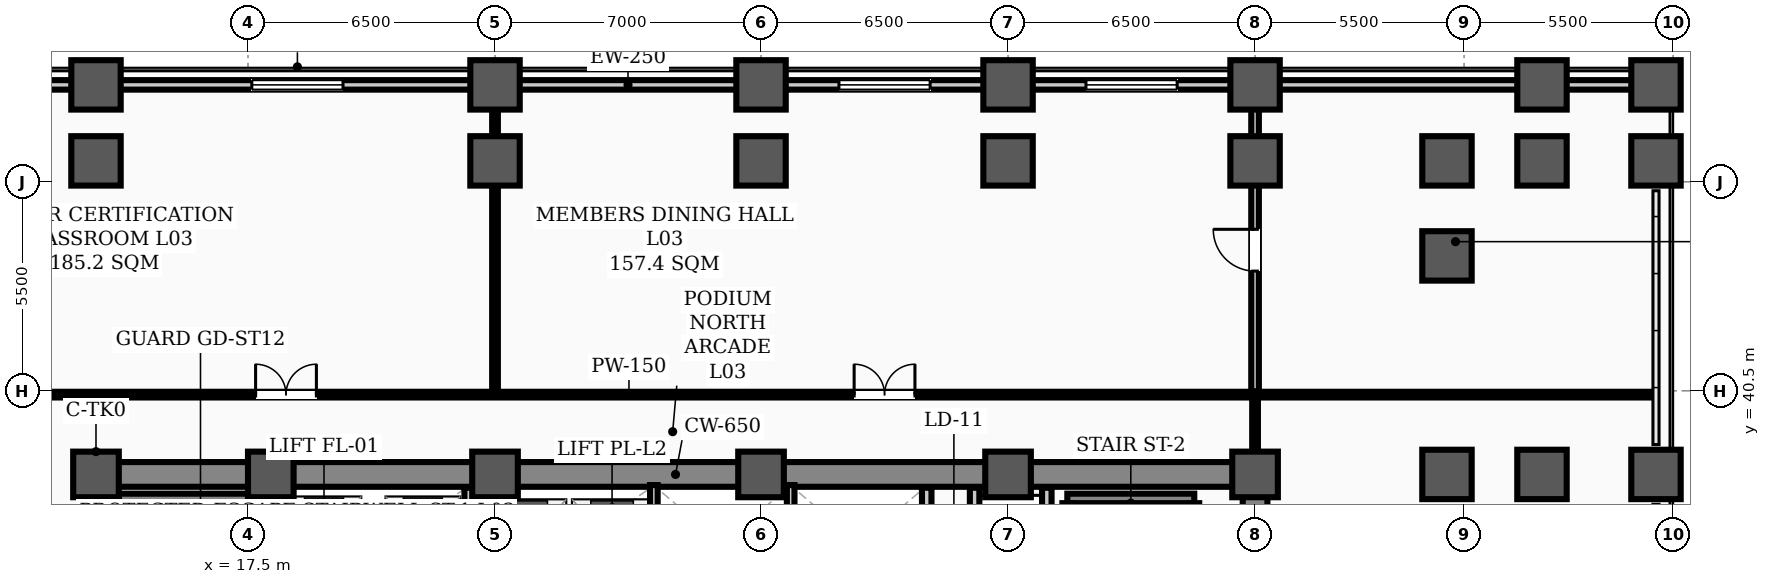
"""IFC4 building model, lengths in metres.
Left out: names, types, materials, properties, quantities, classifications, styles, units other than length and angle.
Written with IfcOpenShell. Run it as: python <this file> out.ifc"""

import sys

from ifc_helpers import new_model, si_unit, direction, frame, frame_2d, origin, origin_2d, place, context, subcontext, project, spatial, rectangle, hollow_rectangle, extrude, element, fill, save


model = new_model("IFC4")
c1 = context("Model", 3, precision=1e-05, world=origin(), true_north=direction((0.0, 1.0)))
c2 = subcontext(c1, "Body", "Model", "MODEL_VIEW")
j1 = project(units=[si_unit("LENGTHUNIT", "METRE"), si_unit("PLANEANGLEUNIT", "RADIAN")], contexts=[c1])
p1 = place(None, origin())
s1 = spatial("IfcSite", under=j1, at=p1, CompositionType="ELEMENT")
p2 = place(p1, origin())
s2 = spatial("IfcBuilding", under=s1, at=p2, CompositionType="ELEMENT")
p3 = place(p2, frame((0.0, 0.0, 11.2)))
s3 = spatial("IfcBuildingStorey", under=s2, at=p3, CompositionType="ELEMENT", Elevation=11.2)
for number, where, z_axis, x_axis in (
    (1, (13.5, 38.3, 0.0), (0.0, 0.0, 1.0), (1.0, 0.0, 0.0)),
    (2, (18.1, 38.3, 0.0), (0.0, 0.0, 1.0), (1.0, 0.0, 0.0)),
    (3, (24.0, 38.3, 0.0), (0.0, 0.0, 1.0), (1.0, 0.0, 0.0)),
    (4, (31.0, 38.3, 0.0), (0.0, 0.0, 1.0), (1.0, 0.0, 0.0)),
    (5, (37.5, 38.3, 0.0), (0.0, 0.0, 1.0), (1.0, 0.0, 0.0)),
    (6, (44.0, 38.3, 0.0), (0.0, 0.0, 1.0), (1.0, 0.0, 0.0)),
):
    element("IfcColumn", number, at=place(p3, frame(where, z_axis=z_axis, x_axis=x_axis)), inside=s3, PredefinedType="COLUMN", context=c2, shape_type="SweptSolid", body=[
        extrude(hollow_rectangle(XDim=1.2, YDim=1.2, WallThickness=0.04, InnerFilletRadius=0.02, OuterFilletRadius=0.06, at=origin_2d()), origin(), (0.0, 0.0, 1.0), 5.4),
    ])
for number, where, z_axis, x_axis in (
    (7, (13.5, 46.55, 0.0), (0.0, 0.0, 1.0), (1.0, 0.0, 0.0)),
    (8, (13.5, 48.55, 0.0), (0.0, 0.0, 1.0), (1.0, 0.0, 0.0)),
    (9, (24.0, 46.55, 0.0), (0.0, 0.0, 1.0), (1.0, 0.0, 0.0)),
    (10, (24.0, 48.55, 0.0), (0.0, 0.0, 1.0), (1.0, 0.0, 0.0)),
    (11, (31.0, 46.55, 0.0), (0.0, 0.0, 1.0), (1.0, 0.0, 0.0)),
    (12, (31.0, 48.55, 0.0), (0.0, 0.0, 1.0), (1.0, 0.0, 0.0)),
    (13, (37.5, 46.55, 0.0), (0.0, 0.0, 1.0), (1.0, 0.0, 0.0)),
    (14, (37.5, 48.55, 0.0), (0.0, 0.0, 1.0), (1.0, 0.0, 0.0)),
    (15, (44.0, 46.55, 0.0), (0.0, 0.0, 1.0), (1.0, 0.0, 0.0)),
    (16, (44.0, 48.55, 0.0), (0.0, 0.0, 1.0), (1.0, 0.0, 0.0)),
    (17, (49.05, 38.3, 0.0), (0.0, 0.0, 1.0), (1.0, 0.0, 0.0)),
    (18, (49.05, 44.05, 0.0), (0.0, 0.0, 1.0), (1.0, 0.0, 0.0)),
    (19, (49.05, 46.55, 0.0), (0.0, 0.0, 1.0), (1.0, 0.0, 0.0)),
    (20, (51.55, 38.3, 0.0), (0.0, 0.0, 1.0), (1.0, 0.0, 0.0)),
    (21, (51.55, 46.55, 0.0), (0.0, 0.0, 1.0), (1.0, 0.0, 0.0)),
    (22, (51.55, 48.55, 0.0), (0.0, 0.0, 1.0), (1.0, 0.0, 0.0)),
    (23, (54.55, 38.3, 0.0), (0.0, 0.0, 1.0), (1.0, 0.0, 0.0)),
    (24, (54.55, 46.55, 0.0), (0.0, 0.0, 1.0), (1.0, 0.0, 0.0)),
    (25, (54.55, 48.55, 0.0), (0.0, 0.0, 1.0), (1.0, 0.0, 0.0)),
):
    element("IfcColumn", number, at=place(p3, frame(where, z_axis=z_axis, x_axis=x_axis)), inside=s3, PredefinedType="COLUMN", context=c2, shape_type="SweptSolid", body=[
        extrude(rectangle(XDim=1.3, YDim=1.3, at=origin_2d()), origin(), (0.0, 0.0, 1.0), 5.4),
    ])
p4 = place(p3, frame((0.45, 48.55, 0.0), z_axis=(0.0, 0.0, 1.0), x_axis=(1.0, 0.0, 0.0)))
e26 = element("IfcWall", 26, at=p4, inside=s3, PredefinedType="STANDARD", context=c2, shape_type="SweptSolid", body=[
    extrude(rectangle(XDim=54.1, YDim=0.25, at=frame_2d((27.05, 0.0))), origin(), (0.0, 0.0, 1.0), 4.37),
])
p5 = place(p4, frame((7.55, 0.0, 0.9)))
e27 = element("IfcOpeningElement", 27, at=p5, cuts=e26, PredefinedType="OPENING", context=c2, shape_type="SweptSolid", body=[
    extrude(rectangle(XDim=2.4, YDim=2.1, at=frame_2d((1.2, 1.05))), frame((0.0, 0.135, 0.0), z_axis=(0.0, -1.0, 0.0), x_axis=(1.0, 0.0, 0.0)), (0.0, 0.0, 1.0), 0.27),
])
p6 = place(p4, frame((17.15, 0.0, 0.9)))
e28 = element("IfcOpeningElement", 28, at=p6, cuts=e26, PredefinedType="OPENING", context=c2, shape_type="SweptSolid", body=[
    extrude(rectangle(XDim=2.4, YDim=2.1, at=frame_2d((1.2, 1.05))), frame((0.0, 0.135, 0.0), z_axis=(0.0, -1.0, 0.0), x_axis=(1.0, 0.0, 0.0)), (0.0, 0.0, 1.0), 0.27),
])
p7 = place(p4, frame((32.6, 0.0, 0.9)))
e29 = element("IfcOpeningElement", 29, at=p7, cuts=e26, PredefinedType="OPENING", context=c2, shape_type="SweptSolid", body=[
    extrude(rectangle(XDim=2.4, YDim=2.1, at=frame_2d((1.2, 1.05))), frame((0.0, 0.135, 0.0), z_axis=(0.0, -1.0, 0.0), x_axis=(1.0, 0.0, 0.0)), (0.0, 0.0, 1.0), 0.27),
])
p8 = place(p4, frame((39.1, 0.0, 0.9)))
e30 = element("IfcOpeningElement", 30, at=p8, cuts=e26, PredefinedType="OPENING", context=c2, shape_type="SweptSolid", body=[
    extrude(rectangle(XDim=2.4, YDim=2.1, at=frame_2d((1.2, 1.05))), frame((0.0, 0.135, 0.0), z_axis=(0.0, -1.0, 0.0), x_axis=(1.0, 0.0, 0.0)), (0.0, 0.0, 1.0), 0.27),
])
p9 = place(p3, frame((13.5, 38.3, 0.0), z_axis=(0.0, 0.0, 1.0), x_axis=(1.0, 0.0, 0.0)))
e31 = element("IfcWall", 31, at=p9, inside=s3, PredefinedType="SHEAR", context=c2, shape_type="SweptSolid", body=[
    extrude(rectangle(XDim=30.5, YDim=0.65, at=frame_2d((15.25, 0.0))), origin(), (0.0, 0.0, 1.0), 5.15),
])
for number, where, z_axis, x_axis in (
    (32, (13.5, 29.35, 0.0), (0.0, 0.0, 1.0), (0.0, 1.0, 0.0)),
    (33, (44.0, 29.35, 0.0), (0.0, 0.0, 1.0), (0.0, 1.0, 0.0)),
):
    element("IfcWall", number, at=place(p3, frame(where, z_axis=z_axis, x_axis=x_axis)), inside=s3, PredefinedType="SHEAR", context=c2, shape_type="SweptSolid", body=[
        extrude(rectangle(XDim=8.6, YDim=0.65, at=frame_2d((4.3, 0.0))), origin(), (0.0, 0.0, 1.0), 5.15),
    ])
p10 = place(p3, frame((14.1, 37.669, 0.0), z_axis=(0.0, 0.0, 1.0), x_axis=(1.0, 0.0, 0.0)))
e34 = element("IfcWall", 34, at=p10, inside=s3, PredefinedType="STANDARD", context=c2, shape_type="SweptSolid", body=[
    extrude(rectangle(XDim=3.67, YDim=0.25, at=frame_2d((1.835, 0.0))), origin(), (0.0, 0.0, 1.0), 5.15),
])
for number, where, z_axis, x_axis in (
    (35, (14.425, 30.36, 0.0), (0.0, 0.0, 1.0), (0.0, 1.0, 0.0)),
    (36, (17.775, 30.36, 0.0), (0.0, 0.0, 1.0), (0.0, 1.0, 0.0)),
):
    element("IfcWall", number, at=place(p3, frame(where, z_axis=z_axis, x_axis=x_axis)), inside=s3, PredefinedType="STANDARD", context=c2, shape_type="SweptSolid", body=[
        extrude(rectangle(XDim=7.184, YDim=0.25, at=frame_2d((3.592, 0.0))), origin(), (0.0, 0.0, 1.0), 5.15),
    ])
p11 = place(p3, frame((39.06, 37.669, 0.0), z_axis=(0.0, 0.0, 1.0), x_axis=(1.0, 0.0, 0.0)))
e37 = element("IfcWall", 37, at=p11, inside=s3, PredefinedType="STANDARD", context=c2, shape_type="SweptSolid", body=[
    extrude(rectangle(XDim=3.34, YDim=0.25, at=frame_2d((1.67, 0.0))), origin(), (0.0, 0.0, 1.0), 5.15),
])
for number, where, z_axis, x_axis in (
    (38, (39.055, 30.36, 0.0), (0.0, 0.0, 1.0), (0.0, 1.0, 0.0)),
    (39, (42.405, 30.36, 0.0), (0.0, 0.0, 1.0), (0.0, 1.0, 0.0)),
):
    element("IfcWall", number, at=place(p3, frame(where, z_axis=z_axis, x_axis=x_axis)), inside=s3, PredefinedType="STANDARD", context=c2, shape_type="SweptSolid", body=[
        extrude(rectangle(XDim=7.184, YDim=0.25, at=frame_2d((3.592, 0.0))), origin(), (0.0, 0.0, 1.0), 5.15),
    ])
p12 = place(p3, frame((36.62, 31.95, 0.0), z_axis=(0.0, 0.0, 1.0), x_axis=(0.0, 1.0, 0.0)))
e40 = element("IfcWall", 40, at=p12, inside=s3, PredefinedType="STANDARD", context=c2, shape_type="SweptSolid", body=[
    extrude(rectangle(XDim=6.0, YDim=0.25, at=frame_2d((3.0, 0.0))), origin(), (0.0, 0.0, 1.0), 4.33),
])
p13 = place(p12, frame((0.9, 0.0, 0.0)))
e41 = element("IfcOpeningElement", 41, at=p13, cuts=e40, PredefinedType="OPENING", context=c2, shape_type="SweptSolid", body=[
    extrude(rectangle(XDim=1.1, YDim=2.08, at=frame_2d((0.55, 1.04))), frame((0.0, 0.135, 0.0), z_axis=(0.0, -1.0, 0.0), x_axis=(1.0, 0.0, 0.0)), (0.0, 0.0, 1.0), 0.27),
])
p14 = place(p12, frame((4.0, 0.0, 0.0)))
e42 = element("IfcOpeningElement", 42, at=p14, cuts=e40, PredefinedType="OPENING", context=c2, shape_type="SweptSolid", body=[
    extrude(rectangle(XDim=1.1, YDim=2.08, at=frame_2d((0.55, 1.04))), frame((0.0, 0.135, 0.0), z_axis=(0.0, -1.0, 0.0), x_axis=(1.0, 0.0, 0.0)), (0.0, 0.0, 1.0), 0.27),
])
p15 = place(p3, frame((38.52, 31.95, 0.0), z_axis=(0.0, 0.0, 1.0), x_axis=(0.0, 1.0, 0.0)))
e43 = element("IfcWall", 43, at=p15, inside=s3, PredefinedType="STANDARD", context=c2, shape_type="SweptSolid", body=[
    extrude(rectangle(XDim=6.0, YDim=0.25, at=frame_2d((3.0, 0.0))), origin(), (0.0, 0.0, 1.0), 4.33),
])
for number, where, z_axis, x_axis in (
    (44, (18.28, 34.62, 0.0), (0.0, 0.0, 1.0), (0.0, 1.0, 0.0)),
    (45, (23.32, 34.62, 0.0), (0.0, 0.0, 1.0), (0.0, 1.0, 0.0)),
):
    element("IfcWall", number, at=place(p3, frame(where, z_axis=z_axis, x_axis=x_axis)), inside=s3, PredefinedType="STANDARD", context=c2, shape_type="SweptSolid", body=[
        extrude(rectangle(XDim=3.33, YDim=0.25, at=frame_2d((1.665, 0.0))), origin(), (0.0, 0.0, 1.0), 4.33),
    ])
p16 = place(p3, frame((35.36, 34.9, 0.0), z_axis=(0.0, 0.0, 1.0), x_axis=(0.0, 1.0, 0.0)))
e46 = element("IfcWall", 46, at=p16, inside=s3, PredefinedType="STANDARD", context=c2, shape_type="SweptSolid", body=[
    extrude(rectangle(XDim=3.05, YDim=0.25, at=frame_2d((1.525, 0.0))), origin(), (0.0, 0.0, 1.0), 4.33),
])
p17 = place(p3, frame((0.58, 40.4, 0.0), z_axis=(0.0, 0.0, 1.0), x_axis=(1.0, 0.0, 0.0)))
e47 = element("IfcWall", 47, at=p17, inside=s3, PredefinedType="PARTITIONING", context=c2, shape_type="SweptSolid", body=[
    extrude(rectangle(XDim=53.89, YDim=0.15, at=frame_2d((26.945, 0.0))), origin(), (0.0, 0.0, 1.0), 4.43),
])
p18 = place(p17, frame((17.12, 0.0, 0.0)))
e48 = element("IfcOpeningElement", 48, at=p18, cuts=e47, PredefinedType="OPENING", context=c2, shape_type="SweptSolid", body=[
    extrude(rectangle(XDim=1.6, YDim=2.08, at=frame_2d((0.8, 1.04))), frame((0.0, 0.085, 0.0), z_axis=(0.0, -1.0, 0.0), x_axis=(1.0, 0.0, 0.0)), (0.0, 0.0, 1.0), 0.17),
])
p19 = place(p17, frame((32.87, 0.0, 0.0)))
e49 = element("IfcOpeningElement", 49, at=p19, cuts=e47, PredefinedType="OPENING", context=c2, shape_type="SweptSolid", body=[
    extrude(rectangle(XDim=1.6, YDim=2.08, at=frame_2d((0.8, 1.04))), frame((0.0, 0.085, 0.0), z_axis=(0.0, -1.0, 0.0), x_axis=(1.0, 0.0, 0.0)), (0.0, 0.0, 1.0), 0.17),
])
p20 = place(p3, frame((24.0, 40.485, 0.0), z_axis=(0.0, 0.0, 1.0), x_axis=(0.0, 1.0, 0.0)))
e50 = element("IfcWall", 50, at=p20, inside=s3, PredefinedType="PARTITIONING", context=c2, shape_type="SweptSolid", body=[
    extrude(rectangle(XDim=7.935, YDim=0.15, at=frame_2d((3.967, 0.0))), origin(), (0.0, 0.0, 1.0), 4.33),
])
p21 = place(p3, frame((44.0, 40.485, 0.0), z_axis=(0.0, 0.0, 1.0), x_axis=(0.0, 1.0, 0.0)))
e51 = element("IfcWall", 51, at=p21, inside=s3, PredefinedType="STANDARD", context=c2, shape_type="SweptSolid", body=[
    extrude(rectangle(XDim=7.935, YDim=0.2, at=frame_2d((3.967, 0.0))), origin(), (0.0, 0.0, 1.0), 4.33),
])
p22 = place(p21, frame((3.165, 0.0, 0.0)))
e52 = element("IfcOpeningElement", 52, at=p22, cuts=e51, PredefinedType="OPENING", context=c2, shape_type="SweptSolid", body=[
    extrude(rectangle(XDim=1.1, YDim=2.08, at=frame_2d((0.55, 1.04))), frame((0.0, 0.11, 0.0), z_axis=(0.0, -1.0, 0.0), x_axis=(1.0, 0.0, 0.0)), (0.0, 0.0, 1.0), 0.22),
])
p23 = place(p3, frame((44.0, 38.635, 0.0), z_axis=(0.0, 0.0, 1.0), x_axis=(0.0, 1.0, 0.0)))
e53 = element("IfcWall", 53, at=p23, inside=s3, PredefinedType="PARTITIONING", context=c2, shape_type="SweptSolid", body=[
    extrude(rectangle(XDim=1.68, YDim=0.15, at=frame_2d((0.84, 0.0))), origin(), (0.0, 0.0, 1.0), 4.33),
])
for number, where, z_axis, x_axis in (
    (54, (23.72, 34.9, 0.0), (0.0, 0.0, 1.0), (0.0, 1.0, 0.0)),
    (55, (28.18, 34.9, 0.0), (0.0, 0.0, 1.0), (0.0, 1.0, 0.0)),
    (56, (31.78, 34.9, 0.0), (0.0, 0.0, 1.0), (0.0, 1.0, 0.0)),
):
    element("IfcWall", number, at=place(p3, frame(where, z_axis=z_axis, x_axis=x_axis)), inside=s3, PredefinedType="STANDARD", context=c2, shape_type="SweptSolid", body=[
        extrude(rectangle(XDim=3.12, YDim=0.2, at=frame_2d((1.56, 0.0))), origin(), (0.0, 0.0, 1.0), 4.33),
    ])
p24 = place(p6, origin())
e57 = element("IfcWindow", 57, at=p24, inside=s3, PartitioningType="SINGLE_PANEL", PredefinedType="WINDOW", context=c2, shape_type="SweptSolid", body=[
    extrude(rectangle(XDim=2.4, YDim=2.1, at=frame_2d((1.2, 1.05))), frame((0.0, 0.03, 0.0), z_axis=(0.0, -1.0, 0.0), x_axis=(1.0, 0.0, 0.0)), (0.0, 0.0, 1.0), 0.06),
])
fill(e28, e57)
p25 = place(p7, origin())
e58 = element("IfcWindow", 58, at=p25, inside=s3, PartitioningType="SINGLE_PANEL", PredefinedType="WINDOW", context=c2, shape_type="SweptSolid", body=[
    extrude(rectangle(XDim=2.4, YDim=2.1, at=frame_2d((1.2, 1.05))), frame((0.0, 0.03, 0.0), z_axis=(0.0, -1.0, 0.0), x_axis=(1.0, 0.0, 0.0)), (0.0, 0.0, 1.0), 0.06),
])
fill(e29, e58)
p26 = place(p8, origin())
e59 = element("IfcWindow", 59, at=p26, inside=s3, PartitioningType="SINGLE_PANEL", PredefinedType="WINDOW", context=c2, shape_type="SweptSolid", body=[
    extrude(rectangle(XDim=2.4, YDim=2.1, at=frame_2d((1.2, 1.05))), frame((0.0, 0.03, 0.0), z_axis=(0.0, -1.0, 0.0), x_axis=(1.0, 0.0, 0.0)), (0.0, 0.0, 1.0), 0.06),
])
fill(e30, e59)
p27 = place(p18, origin())
e60 = element("IfcDoor", 60, at=p27, inside=s3, OperationType="DOUBLE_DOOR_SINGLE_SWING", PredefinedType="DOOR", context=c2, shape_type="SweptSolid", body=[
    extrude(rectangle(XDim=1.6, YDim=2.08, at=frame_2d((0.8, 1.04))), frame((0.0, 0.025, 0.0), z_axis=(0.0, -1.0, 0.0), x_axis=(1.0, 0.0, 0.0)), (0.0, 0.0, 1.0), 0.05),
])
fill(e48, e60)
p28 = place(p19, origin())
e61 = element("IfcDoor", 61, at=p28, inside=s3, OperationType="DOUBLE_DOOR_SINGLE_SWING", PredefinedType="DOOR", context=c2, shape_type="SweptSolid", body=[
    extrude(rectangle(XDim=1.6, YDim=2.08, at=frame_2d((0.8, 1.04))), frame((0.0, 0.025, 0.0), z_axis=(0.0, -1.0, 0.0), x_axis=(1.0, 0.0, 0.0)), (0.0, 0.0, 1.0), 0.05),
])
fill(e49, e61)
p29 = place(p22, origin())
e62 = element("IfcDoor", 62, at=p29, inside=s3, OperationType="SINGLE_SWING_RIGHT", PredefinedType="DOOR", context=c2, shape_type="SweptSolid", body=[
    extrude(rectangle(XDim=1.1, YDim=2.08, at=frame_2d((0.55, 1.04))), frame((0.0, 0.025, 0.0), z_axis=(0.0, -1.0, 0.0), x_axis=(1.0, 0.0, 0.0)), (0.0, 0.0, 1.0), 0.05),
])
fill(e52, e62)
save(model, sys.argv[1])
